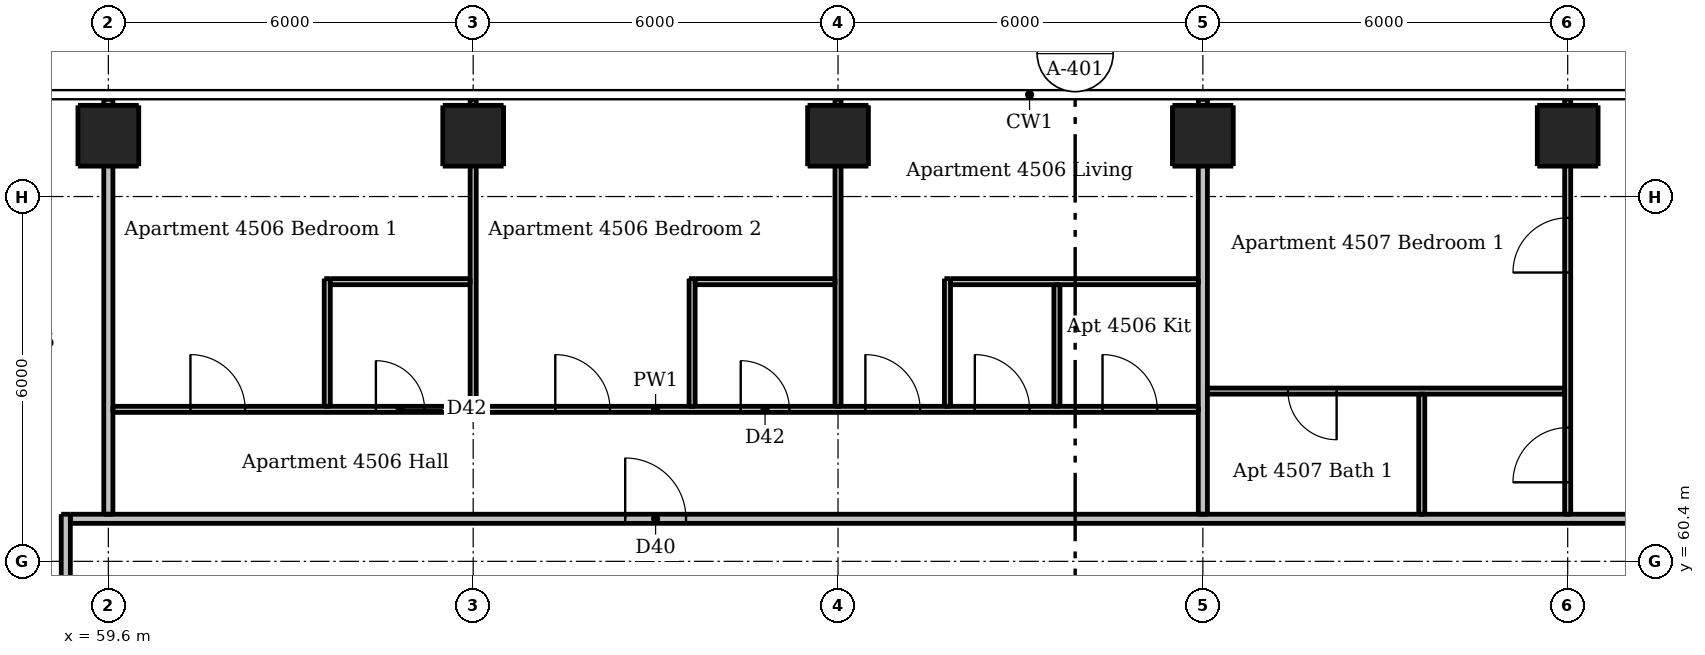
"""IFC4 building model, lengths in metres.
Left out: names, types, materials, properties, quantities, classifications, styles, units other than length and angle.
Written with IfcOpenShell. Run it as: python <this file> out.ifc"""

import sys

from ifc_helpers import new_model, si_unit, direction, frame, frame_2d, origin, origin_2d, place, context, subcontext, project, spatial, rectangle, extrude, element, fill, save


model = new_model("IFC4")
c1 = context("Model", 3, precision=1e-05, world=origin(), true_north=direction((0.0, 1.0)))
c2 = subcontext(c1, "Body", "Model", "MODEL_VIEW")
j1 = project(units=[si_unit("LENGTHUNIT", "METRE"), si_unit("PLANEANGLEUNIT", "RADIAN")], contexts=[c1])
p1 = place(None, origin())
s1 = spatial("IfcSite", under=j1, at=p1, CompositionType="ELEMENT")
p2 = place(p1, origin())
s2 = spatial("IfcBuilding", under=s1, at=p2, CompositionType="ELEMENT")
p3 = place(p2, frame((0.0, 0.0, 168.1)))
s3 = spatial("IfcBuildingStorey", under=s2, at=p3, CompositionType="ELEMENT", Elevation=168.1)
for number, where, z_axis, x_axis in (
    (1, (59.6, 67.4, 0.0), (0.0, 0.0, 1.0), (1.0, 0.0, 0.0)),
    (2, (65.6, 67.4, 0.0), (0.0, 0.0, 1.0), (1.0, 0.0, 0.0)),
    (3, (71.6, 67.4, 0.0), (0.0, 0.0, 1.0), (1.0, 0.0, 0.0)),
    (4, (77.6, 67.4, 0.0), (0.0, 0.0, 1.0), (1.0, 0.0, 0.0)),
    (5, (83.6, 67.4, 0.0), (0.0, 0.0, 1.0), (1.0, 0.0, 0.0)),
):
    element("IfcColumn", number, at=place(p3, frame(where, z_axis=z_axis, x_axis=x_axis)), inside=s3, PredefinedType="COLUMN", context=c2, shape_type="SweptSolid", body=[
        extrude(rectangle(XDim=1.0, YDim=1.0, at=origin_2d()), origin(), (0.0, 0.0, 1.0), 3.05),
    ])
p4 = place(p3, frame((63.2, 62.95, 0.0), z_axis=(0.0, 0.0, 1.0), x_axis=(0.0, 1.0, 0.0)))
e6 = element("IfcWall", 6, at=p4, inside=s3, PredefinedType="PARTITIONING", context=c2, shape_type="SweptSolid", body=[
    extrude(rectangle(XDim=2.1, YDim=0.1, at=frame_2d((1.05, 0.0))), origin(), (0.0, 0.0, 1.0), 3.05),
])
p5 = place(p3, frame((65.6, 62.95, 0.0), z_axis=(0.0, 0.0, 1.0), x_axis=(0.0, 1.0, 0.0)))
e7 = element("IfcWall", 7, at=p5, inside=s3, PredefinedType="PARTITIONING", context=c2, shape_type="SweptSolid", body=[
    extrude(rectangle(XDim=5.05, YDim=0.1, at=frame_2d((2.525, 0.0))), origin(), (0.0, 0.0, 1.0), 2.516),
])
p6 = place(p3, frame((69.2, 62.95, 0.0), z_axis=(0.0, 0.0, 1.0), x_axis=(0.0, 1.0, 0.0)))
e8 = element("IfcWall", 8, at=p6, inside=s3, PredefinedType="PARTITIONING", context=c2, shape_type="SweptSolid", body=[
    extrude(rectangle(XDim=2.1, YDim=0.1, at=frame_2d((1.05, 0.0))), origin(), (0.0, 0.0, 1.0), 3.05),
])
p7 = place(p3, frame((71.6, 62.95, 0.0), z_axis=(0.0, 0.0, 1.0), x_axis=(0.0, 1.0, 0.0)))
e9 = element("IfcWall", 9, at=p7, inside=s3, PredefinedType="PARTITIONING", context=c2, shape_type="SweptSolid", body=[
    extrude(rectangle(XDim=5.05, YDim=0.1, at=frame_2d((2.525, 0.0))), origin(), (0.0, 0.0, 1.0), 2.516),
])
p8 = place(p3, frame((73.4, 62.95, 0.0), z_axis=(0.0, 0.0, 1.0), x_axis=(0.0, 1.0, 0.0)))
e10 = element("IfcWall", 10, at=p8, inside=s3, PredefinedType="PARTITIONING", context=c2, shape_type="SweptSolid", body=[
    extrude(rectangle(XDim=2.1, YDim=0.1, at=frame_2d((1.05, 0.0))), origin(), (0.0, 0.0, 1.0), 3.05),
])
p9 = place(p3, frame((75.2, 62.95, 0.0), z_axis=(0.0, 0.0, 1.0), x_axis=(0.0, 1.0, 0.0)))
e11 = element("IfcWall", 11, at=p9, inside=s3, PredefinedType="PARTITIONING", context=c2, shape_type="SweptSolid", body=[
    extrude(rectangle(XDim=2.0, YDim=0.1, at=frame_2d((1.0, 0.0))), origin(), (0.0, 0.0, 1.0), 3.05),
])
p10 = place(p3, frame((81.2, 61.175, 0.0), z_axis=(0.0, 0.0, 1.0), x_axis=(0.0, 1.0, 0.0)))
e12 = element("IfcWall", 12, at=p10, inside=s3, PredefinedType="PARTITIONING", context=c2, shape_type="SweptSolid", body=[
    extrude(rectangle(XDim=1.975, YDim=0.1, at=frame_2d((0.987, 0.0))), origin(), (0.0, 0.0, 1.0), 3.05),
])
p11 = place(p3, frame((83.6, 61.175, 0.0), z_axis=(0.0, 0.0, 1.0), x_axis=(0.0, 1.0, 0.0)))
e13 = element("IfcWall", 13, at=p11, inside=s3, PredefinedType="PARTITIONING", context=c2, shape_type="SweptSolid", body=[
    extrude(rectangle(XDim=6.825, YDim=0.1, at=frame_2d((3.413, 0.0))), origin(), (0.0, 0.0, 1.0), 2.516),
])
p12 = place(p11, frame((0.525, 0.0, 0.0)))
e14 = element("IfcOpeningElement", 14, at=p12, cuts=e13, PredefinedType="OPENING", context=c2, shape_type="SweptSolid", body=[
    extrude(rectangle(XDim=0.9, YDim=2.1, at=frame_2d((0.45, 1.05))), frame((0.0, 0.06, 0.0), z_axis=(0.0, -1.0, 0.0), x_axis=(1.0, 0.0, 0.0)), (0.0, 0.0, 1.0), 0.12),
])
p13 = place(p11, frame((3.975, 0.0, 0.0)))
e15 = element("IfcOpeningElement", 15, at=p13, cuts=e13, PredefinedType="OPENING", context=c2, shape_type="SweptSolid", body=[
    extrude(rectangle(XDim=0.9, YDim=2.1, at=frame_2d((0.45, 1.05))), frame((0.0, 0.06, 0.0), z_axis=(0.0, -1.0, 0.0), x_axis=(1.0, 0.0, 0.0)), (0.0, 0.0, 1.0), 0.12),
])
for number, where, z_axis, x_axis in (
    (16, (63.25, 65.0, 0.0), (0.0, 0.0, 1.0), (1.0, 0.0, 0.0)),
    (17, (69.25, 65.0, 0.0), (0.0, 0.0, 1.0), (1.0, 0.0, 0.0)),
):
    element("IfcWall", number, at=place(p3, frame(where, z_axis=z_axis, x_axis=x_axis)), inside=s3, PredefinedType="PARTITIONING", context=c2, shape_type="SweptSolid", body=[
        extrude(rectangle(XDim=2.3, YDim=0.1, at=frame_2d((1.15, 0.0))), origin(), (0.0, 0.0, 1.0), 3.05),
    ])
p14 = place(p3, frame((73.45, 65.0, 0.0), z_axis=(0.0, 0.0, 1.0), x_axis=(1.0, 0.0, 0.0)))
e18 = element("IfcWall", 18, at=p14, inside=s3, PredefinedType="PARTITIONING", context=c2, shape_type="SweptSolid", body=[
    extrude(rectangle(XDim=4.075, YDim=0.1, at=frame_2d((2.038, 0.0))), origin(), (0.0, 0.0, 1.0), 3.05),
])
p15 = place(p3, frame((83.55, 63.2, 0.0), z_axis=(0.0, 0.0, 1.0), x_axis=(-1.0, 0.0, 0.0)))
e19 = element("IfcWall", 19, at=p15, inside=s3, PredefinedType="PARTITIONING", context=c2, shape_type="SweptSolid", body=[
    extrude(rectangle(XDim=5.875, YDim=0.1, at=frame_2d((2.938, 0.0))), origin(), (0.0, 0.0, 1.0), 3.05),
])
p16 = place(p15, frame((3.75, 0.0, 0.0)))
e20 = element("IfcOpeningElement", 20, at=p16, cuts=e19, PredefinedType="OPENING", context=c2, shape_type="SweptSolid", body=[
    extrude(rectangle(XDim=0.8, YDim=2.1, at=frame_2d((0.4, 1.05))), frame((0.0, 0.06, 0.0), z_axis=(0.0, -1.0, 0.0), x_axis=(1.0, 0.0, 0.0)), (0.0, 0.0, 1.0), 0.12),
])
p17 = place(p3, frame((59.675, 62.9, 0.0), z_axis=(0.0, 0.0, 1.0), x_axis=(1.0, 0.0, 0.0)))
e21 = element("IfcWall", 21, at=p17, inside=s3, PredefinedType="PARTITIONING", context=c2, shape_type="SweptSolid", body=[
    extrude(rectangle(XDim=17.85, YDim=0.1, at=frame_2d((8.925, 0.0))), origin(), (0.0, 0.0, 1.0), 3.05),
])
p18 = place(p17, frame((12.375, 0.0, 0.0)))
e22 = element("IfcOpeningElement", 22, at=p18, cuts=e21, PredefinedType="OPENING", context=c2, shape_type="SweptSolid", body=[
    extrude(rectangle(XDim=0.9, YDim=2.1, at=frame_2d((0.45, 1.05))), frame((0.0, 0.06, 0.0), z_axis=(0.0, -1.0, 0.0), x_axis=(1.0, 0.0, 0.0)), (0.0, 0.0, 1.0), 0.12),
])
p19 = place(p17, frame((16.275, 0.0, 0.0)))
e23 = element("IfcOpeningElement", 23, at=p19, cuts=e21, PredefinedType="OPENING", context=c2, shape_type="SweptSolid", body=[
    extrude(rectangle(XDim=0.9, YDim=2.1, at=frame_2d((0.45, 1.05))), frame((0.0, 0.06, 0.0), z_axis=(0.0, -1.0, 0.0), x_axis=(1.0, 0.0, 0.0)), (0.0, 0.0, 1.0), 0.12),
])
p20 = place(p17, frame((14.175, 0.0, 0.0)))
e24 = element("IfcOpeningElement", 24, at=p20, cuts=e21, PredefinedType="OPENING", context=c2, shape_type="SweptSolid", body=[
    extrude(rectangle(XDim=0.9, YDim=2.1, at=frame_2d((0.45, 1.05))), frame((0.0, 0.06, 0.0), z_axis=(0.0, -1.0, 0.0), x_axis=(1.0, 0.0, 0.0)), (0.0, 0.0, 1.0), 0.12),
])
p21 = place(p17, frame((1.275, 0.0, 0.0)))
e25 = element("IfcOpeningElement", 25, at=p21, cuts=e21, PredefinedType="OPENING", context=c2, shape_type="SweptSolid", body=[
    extrude(rectangle(XDim=0.9, YDim=2.1, at=frame_2d((0.45, 1.05))), frame((0.0, 0.06, 0.0), z_axis=(0.0, -1.0, 0.0), x_axis=(1.0, 0.0, 0.0)), (0.0, 0.0, 1.0), 0.12),
])
p22 = place(p17, frame((7.275, 0.0, 0.0)))
e26 = element("IfcOpeningElement", 26, at=p22, cuts=e21, PredefinedType="OPENING", context=c2, shape_type="SweptSolid", body=[
    extrude(rectangle(XDim=0.9, YDim=2.1, at=frame_2d((0.45, 1.05))), frame((0.0, 0.06, 0.0), z_axis=(0.0, -1.0, 0.0), x_axis=(1.0, 0.0, 0.0)), (0.0, 0.0, 1.0), 0.12),
])
p23 = place(p17, frame((4.325, 0.0, 0.0)))
e27 = element("IfcOpeningElement", 27, at=p23, cuts=e21, PredefinedType="OPENING", context=c2, shape_type="SweptSolid", body=[
    extrude(rectangle(XDim=0.8, YDim=2.1, at=frame_2d((0.4, 1.05))), frame((0.0, 0.06, 0.0), z_axis=(0.0, -1.0, 0.0), x_axis=(1.0, 0.0, 0.0)), (0.0, 0.0, 1.0), 0.12),
])
p24 = place(p17, frame((10.325, 0.0, 0.0)))
e28 = element("IfcOpeningElement", 28, at=p24, cuts=e21, PredefinedType="OPENING", context=c2, shape_type="SweptSolid", body=[
    extrude(rectangle(XDim=0.8, YDim=2.1, at=frame_2d((0.4, 1.05))), frame((0.0, 0.06, 0.0), z_axis=(0.0, -1.0, 0.0), x_axis=(1.0, 0.0, 0.0)), (0.0, 0.0, 1.0), 0.12),
])
p25 = place(p3, frame((58.9, 30.325, 0.0), z_axis=(0.0, 0.0, 1.0), x_axis=(0.0, 1.0, 0.0)))
e29 = element("IfcWall", 29, at=p25, inside=s3, PredefinedType="PARTITIONING", context=c2, shape_type="SweptSolid", body=[
    extrude(rectangle(XDim=30.85, YDim=0.15, at=frame_2d((15.425, 0.0))), origin(), (0.0, 0.0, 1.0), 3.05),
])
p26 = place(p25, frame((9.225, 0.0, 0.0)))
e30 = element("IfcOpeningElement", 30, at=p26, cuts=e29, PredefinedType="OPENING", context=c2, shape_type="SweptSolid", body=[
    extrude(rectangle(XDim=1.0, YDim=2.1, at=frame_2d((0.5, 1.05))), frame((0.0, 0.085, 0.0), z_axis=(0.0, -1.0, 0.0), x_axis=(1.0, 0.0, 0.0)), (0.0, 0.0, 1.0), 0.17),
])
p27 = place(p25, frame((26.925, 0.0, 0.0)))
e31 = element("IfcOpeningElement", 31, at=p27, cuts=e29, PredefinedType="OPENING", context=c2, shape_type="SweptSolid", body=[
    extrude(rectangle(XDim=1.0, YDim=2.1, at=frame_2d((0.5, 1.05))), frame((0.0, 0.085, 0.0), z_axis=(0.0, -1.0, 0.0), x_axis=(1.0, 0.0, 0.0)), (0.0, 0.0, 1.0), 0.17),
])
p28 = place(p3, frame((59.6, 61.175, 0.0), z_axis=(0.0, 0.0, 1.0), x_axis=(0.0, 1.0, 0.0)))
e32 = element("IfcWall", 32, at=p28, inside=s3, PredefinedType="PARTITIONING", context=c2, shape_type="SweptSolid", body=[
    extrude(rectangle(XDim=6.825, YDim=0.15, at=frame_2d((3.413, 0.0))), origin(), (0.0, 0.0, 1.0), 2.51),
])
p29 = place(p3, frame((77.6, 61.175, 0.0), z_axis=(0.0, 0.0, 1.0), x_axis=(0.0, 1.0, 0.0)))
e33 = element("IfcWall", 33, at=p29, inside=s3, PredefinedType="PARTITIONING", context=c2, shape_type="SweptSolid", body=[
    extrude(rectangle(XDim=6.825, YDim=0.15, at=frame_2d((3.413, 0.0))), origin(), (0.0, 0.0, 1.0), 2.516),
])
p30 = place(p3, frame((58.975, 61.1, 0.0), z_axis=(0.0, 0.0, 1.0), x_axis=(1.0, 0.0, 0.0)))
e34 = element("IfcWall", 34, at=p30, inside=s3, PredefinedType="PARTITIONING", context=c2, shape_type="SweptSolid", body=[
    extrude(rectangle(XDim=29.25, YDim=0.15, at=frame_2d((14.625, 0.0))), origin(), (0.0, 0.0, 1.0), 3.05),
])
p31 = place(p30, frame((9.125, 0.0, 0.0)))
e35 = element("IfcOpeningElement", 35, at=p31, cuts=e34, PredefinedType="OPENING", context=c2, shape_type="SweptSolid", body=[
    extrude(rectangle(XDim=1.0, YDim=2.1, at=frame_2d((0.5, 1.05))), frame((0.0, 0.085, 0.0), z_axis=(0.0, -1.0, 0.0), x_axis=(1.0, 0.0, 0.0)), (0.0, 0.0, 1.0), 0.17),
])
p32 = place(p30, frame((26.475, 0.0, 0.0)))
e36 = element("IfcOpeningElement", 36, at=p32, cuts=e34, PredefinedType="OPENING", context=c2, shape_type="SweptSolid", body=[
    extrude(rectangle(XDim=1.0, YDim=2.1, at=frame_2d((0.5, 1.05))), frame((0.0, 0.085, 0.0), z_axis=(0.0, -1.0, 0.0), x_axis=(1.0, 0.0, 0.0)), (0.0, 0.0, 1.0), 0.17),
])
p33 = place(p31, origin())
e37 = element("IfcDoor", 37, at=p33, inside=s3, OperationType="SINGLE_SWING_LEFT", PredefinedType="DOOR", context=c2, shape_type="SweptSolid", body=[
    extrude(rectangle(XDim=1.0, YDim=2.1, at=frame_2d((0.5, 1.05))), frame((0.0, 0.025, 0.0), z_axis=(0.0, -1.0, 0.0), x_axis=(1.0, 0.0, 0.0)), (0.0, 0.0, 1.0), 0.05),
])
fill(e35, e37)
p34 = place(p18, origin())
e38 = element("IfcDoor", 38, at=p34, inside=s3, OperationType="SINGLE_SWING_LEFT", PredefinedType="DOOR", context=c2, shape_type="SweptSolid", body=[
    extrude(rectangle(XDim=0.9, YDim=2.1, at=frame_2d((0.45, 1.05))), frame((0.0, 0.025, 0.0), z_axis=(0.0, -1.0, 0.0), x_axis=(1.0, 0.0, 0.0)), (0.0, 0.0, 1.0), 0.05),
])
fill(e22, e38)
p35 = place(p19, origin())
e39 = element("IfcDoor", 39, at=p35, inside=s3, OperationType="SINGLE_SWING_LEFT", PredefinedType="DOOR", context=c2, shape_type="SweptSolid", body=[
    extrude(rectangle(XDim=0.9, YDim=2.1, at=frame_2d((0.45, 1.05))), frame((0.0, 0.025, 0.0), z_axis=(0.0, -1.0, 0.0), x_axis=(1.0, 0.0, 0.0)), (0.0, 0.0, 1.0), 0.05),
])
fill(e23, e39)
p36 = place(p20, origin())
e40 = element("IfcDoor", 40, at=p36, inside=s3, OperationType="SINGLE_SWING_LEFT", PredefinedType="DOOR", context=c2, shape_type="SweptSolid", body=[
    extrude(rectangle(XDim=0.9, YDim=2.1, at=frame_2d((0.45, 1.05))), frame((0.0, 0.025, 0.0), z_axis=(0.0, -1.0, 0.0), x_axis=(1.0, 0.0, 0.0)), (0.0, 0.0, 1.0), 0.05),
])
fill(e24, e40)
p37 = place(p21, origin())
e41 = element("IfcDoor", 41, at=p37, inside=s3, OperationType="SINGLE_SWING_LEFT", PredefinedType="DOOR", context=c2, shape_type="SweptSolid", body=[
    extrude(rectangle(XDim=0.9, YDim=2.1, at=frame_2d((0.45, 1.05))), frame((0.0, 0.025, 0.0), z_axis=(0.0, -1.0, 0.0), x_axis=(1.0, 0.0, 0.0)), (0.0, 0.0, 1.0), 0.05),
])
fill(e25, e41)
p38 = place(p22, origin())
e42 = element("IfcDoor", 42, at=p38, inside=s3, OperationType="SINGLE_SWING_LEFT", PredefinedType="DOOR", context=c2, shape_type="SweptSolid", body=[
    extrude(rectangle(XDim=0.9, YDim=2.1, at=frame_2d((0.45, 1.05))), frame((0.0, 0.025, 0.0), z_axis=(0.0, -1.0, 0.0), x_axis=(1.0, 0.0, 0.0)), (0.0, 0.0, 1.0), 0.05),
])
fill(e26, e42)
p39 = place(p23, origin())
e43 = element("IfcDoor", 43, at=p39, inside=s3, OperationType="SINGLE_SWING_LEFT", PredefinedType="DOOR", context=c2, shape_type="SweptSolid", body=[
    extrude(rectangle(XDim=0.8, YDim=2.1, at=frame_2d((0.4, 1.05))), frame((0.0, 0.025, 0.0), z_axis=(0.0, -1.0, 0.0), x_axis=(1.0, 0.0, 0.0)), (0.0, 0.0, 1.0), 0.05),
])
fill(e27, e43)
p40 = place(p24, origin())
e44 = element("IfcDoor", 44, at=p40, inside=s3, OperationType="SINGLE_SWING_LEFT", PredefinedType="DOOR", context=c2, shape_type="SweptSolid", body=[
    extrude(rectangle(XDim=0.8, YDim=2.1, at=frame_2d((0.4, 1.05))), frame((0.0, 0.025, 0.0), z_axis=(0.0, -1.0, 0.0), x_axis=(1.0, 0.0, 0.0)), (0.0, 0.0, 1.0), 0.05),
])
fill(e28, e44)
p41 = place(p12, origin())
e45 = element("IfcDoor", 45, at=p41, inside=s3, OperationType="SINGLE_SWING_LEFT", PredefinedType="DOOR", context=c2, shape_type="SweptSolid", body=[
    extrude(rectangle(XDim=0.9, YDim=2.1, at=frame_2d((0.45, 1.05))), frame((0.0, 0.025, 0.0), z_axis=(0.0, -1.0, 0.0), x_axis=(1.0, 0.0, 0.0)), (0.0, 0.0, 1.0), 0.05),
])
fill(e14, e45)
p42 = place(p13, origin())
e46 = element("IfcDoor", 46, at=p42, inside=s3, OperationType="SINGLE_SWING_LEFT", PredefinedType="DOOR", context=c2, shape_type="SweptSolid", body=[
    extrude(rectangle(XDim=0.9, YDim=2.1, at=frame_2d((0.45, 1.05))), frame((0.0, 0.025, 0.0), z_axis=(0.0, -1.0, 0.0), x_axis=(1.0, 0.0, 0.0)), (0.0, 0.0, 1.0), 0.05),
])
fill(e15, e46)
p43 = place(p16, origin())
e47 = element("IfcDoor", 47, at=p43, inside=s3, OperationType="SINGLE_SWING_LEFT", PredefinedType="DOOR", context=c2, shape_type="SweptSolid", body=[
    extrude(rectangle(XDim=0.8, YDim=2.1, at=frame_2d((0.4, 1.05))), frame((0.0, 0.025, 0.0), z_axis=(0.0, -1.0, 0.0), x_axis=(1.0, 0.0, 0.0)), (0.0, 0.0, 1.0), 0.05),
])
fill(e20, e47)
save(model, sys.argv[1])
